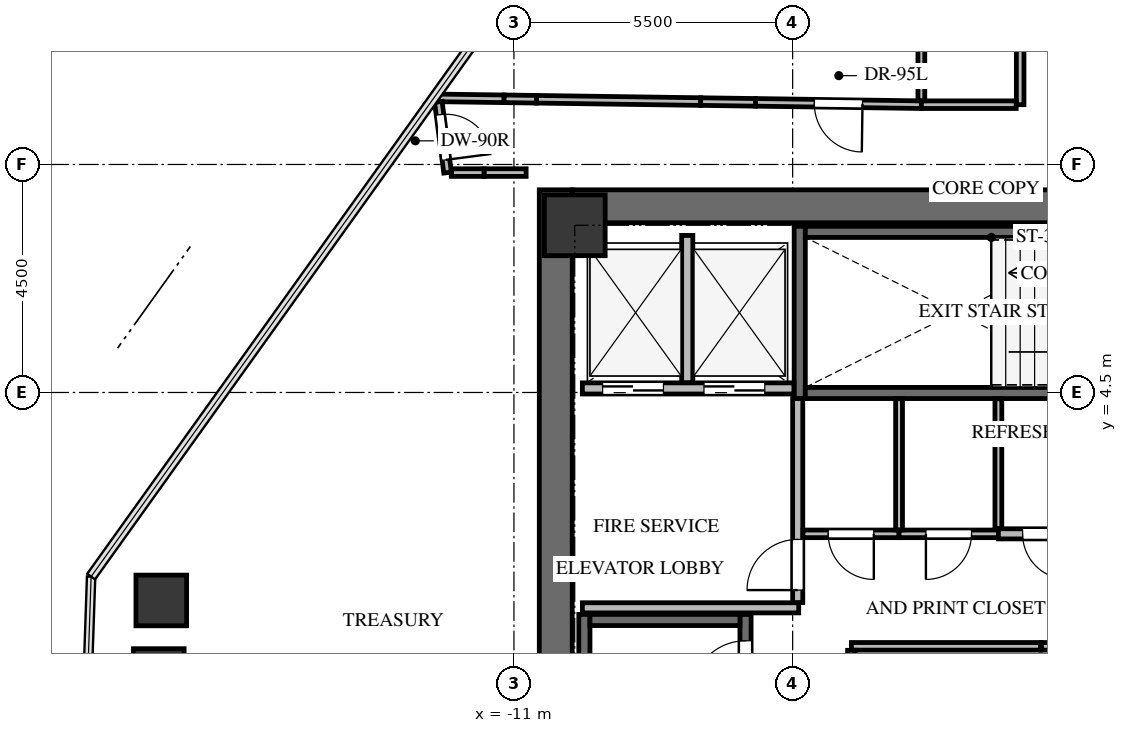
"""IFC4 building model, lengths in metres.
Left out: names, types, materials, properties, quantities, classifications, styles, units other than length and angle.
Written with IfcOpenShell. Run it as: python <this file> out.ifc"""

import sys

from ifc_helpers import new_model, si_unit, direction, frame, frame_2d, origin, origin_2d, place, context, subcontext, project, spatial, rectangle, extrude, source, transform, mapped, element, fill, save


model = new_model("IFC4")
c1 = context("Model", 3, precision=1e-05, world=origin(), true_north=direction((0.0, 1.0)))
c2 = subcontext(c1, "Body", "Model", "MODEL_VIEW")
j1 = project(units=[si_unit("LENGTHUNIT", "METRE"), si_unit("PLANEANGLEUNIT", "RADIAN")], contexts=[c1])
p1 = place(None, origin())
s1 = spatial("IfcSite", under=j1, at=p1, CompositionType="ELEMENT")
p2 = place(p1, origin())
s2 = spatial("IfcBuilding", under=s1, at=p2, CompositionType="ELEMENT")
p3 = place(p2, frame((0.0, 0.0, 203.2)))
s3 = spatial("IfcBuildingStorey", under=s2, at=p3, CompositionType="ELEMENT", Elevation=203.2)
p4 = place(p3, frame((-10.175, -8.5, 0.0), z_axis=(0.0, 0.0, 1.0), x_axis=(0.0, 1.0, 0.0)))
e1 = element("IfcWall", 1, at=p4, inside=s3, PredefinedType="SHEAR", context=c2, shape_type="SweptSolid", body=[
    extrude(rectangle(XDim=17.0, YDim=0.65, at=frame_2d((8.5, 0.0))), origin(), (0.0, 0.0, 1.0), 3.0),
])
p5 = place(p3, frame((-9.85, 8.175, 0.0), z_axis=(0.0, 0.0, 1.0), x_axis=(1.0, 0.0, 0.0)))
e2 = element("IfcWall", 2, at=p5, inside=s3, PredefinedType="SHEAR", context=c2, shape_type="SweptSolid", body=[
    extrude(rectangle(XDim=19.7, YDim=0.65, at=frame_2d((9.85, 0.0))), origin(), (0.0, 0.0, 1.0), 3.0),
])
p6 = place(p3, frame((-6.43, -7.77, -0.24), z_axis=(0.0, 0.0, 1.0), x_axis=(0.0, 1.0, 0.0)))
e3 = element("IfcWall", 3, at=p6, inside=s3, PredefinedType="SHEAR", context=c2, shape_type="SweptSolid", body=[
    extrude(rectangle(XDim=7.89, YDim=0.22, at=frame_2d((3.945, 0.0))), origin(), (0.0, 0.0, 1.0), 3.0),
])
p7 = place(p6, frame((6.32, 0.0, 0.0)))
e4 = element("IfcOpeningElement", 4, at=p7, cuts=e3, PredefinedType="OPENING", context=c2, shape_type="SweptSolid", body=[
    extrude(rectangle(XDim=1.05, YDim=2.15, at=frame_2d((0.525, 1.075))), frame((0.0, 0.12, 0.0), z_axis=(0.0, -1.0, 0.0), x_axis=(1.0, 0.0, 0.0)), (0.0, 0.0, 1.0), 0.24),
])
p8 = place(p3, frame((-9.61, 0.12, -0.24), z_axis=(0.0, 0.0, 1.0), x_axis=(0.0, -1.0, 0.0)))
e5 = element("IfcWall", 5, at=p8, inside=s3, PredefinedType="SHEAR", context=c2, shape_type="SweptSolid", body=[
    extrude(rectangle(XDim=7.89, YDim=0.22, at=frame_2d((3.945, 0.0))), origin(), (0.0, 0.0, 1.0), 3.0),
])
p9 = place(p3, frame((-6.54, 0.01, -0.24), z_axis=(0.0, 0.0, 1.0), x_axis=(-1.0, 0.0, 0.0)))
e6 = element("IfcWall", 6, at=p9, inside=s3, PredefinedType="SHEAR", context=c2, shape_type="SweptSolid", body=[
    extrude(rectangle(XDim=2.96, YDim=0.22, at=frame_2d((1.48, 0.0))), origin(), (0.0, 0.0, 1.0), 3.0),
])
p10 = place(p3, frame((-5.36, 7.78, -0.24), z_axis=(0.0, 0.0, 1.0), x_axis=(0.0, -1.0, 0.0)))
e7 = element("IfcWall", 7, at=p10, inside=s3, PredefinedType="SHEAR", context=c2, shape_type="SweptSolid", body=[
    extrude(rectangle(XDim=3.4, YDim=0.22, at=frame_2d((1.7, 0.0))), origin(), (0.0, 0.0, 1.0), 3.0),
])
p11 = place(p3, frame((-5.25, 4.49, -0.24), z_axis=(0.0, 0.0, 1.0), x_axis=(1.0, 0.0, 0.0)))
e8 = element("IfcWall", 8, at=p11, inside=s3, PredefinedType="SHEAR", context=c2, shape_type="SweptSolid", body=[
    extrude(rectangle(XDim=7.35, YDim=0.22, at=frame_2d((3.675, 0.0))), origin(), (0.0, 0.0, 1.0), 3.0),
])
p12 = place(p11, frame((5.85, 0.0, 0.0)))
e9 = element("IfcOpeningElement", 9, at=p12, cuts=e8, PredefinedType="OPENING", context=c2, shape_type="SweptSolid", body=[
    extrude(rectangle(XDim=1.05, YDim=2.15, at=frame_2d((0.525, 1.075))), frame((0.0, 0.12, 0.0), z_axis=(0.0, -1.0, 0.0), x_axis=(1.0, 0.0, 0.0)), (0.0, 0.0, 1.0), 0.24),
])
p13 = place(p3, frame((2.1, 7.67, -0.24), z_axis=(0.0, 0.0, 1.0), x_axis=(-1.0, 0.0, 0.0)))
e10 = element("IfcWall", 10, at=p13, inside=s3, PredefinedType="SHEAR", context=c2, shape_type="SweptSolid", body=[
    extrude(rectangle(XDim=7.35, YDim=0.22, at=frame_2d((3.675, 0.0))), origin(), (0.0, 0.0, 1.0), 3.0),
])
m1 = source(origin(), c2, "Body", "SweptSolid", [
    extrude(rectangle(XDim=1.2, YDim=1.2, at=origin_2d()), origin(), (0.0, 0.0, 1.0), 3.0),
])
p14 = place(p3, frame((-9.8, 7.8, -0.24), z_axis=(0.0, 0.0, 1.0), x_axis=(1.0, 0.0, 0.0)))
e11 = element("IfcColumn", 11, at=p14, inside=s3, PredefinedType="COLUMN", context=c2, shape_type="MappedRepresentation", body=[
    mapped(m1, transform((0.0, 0.0, 0.0), x_axis=(1.0, 0.0, 0.0), y_axis=(0.0, 1.0, 0.0), z_axis=(0.0, 0.0, 1.0), scale=1.0)),
])
m2 = source(origin(), c2, "Body", "SweptSolid", [
    extrude(rectangle(XDim=1.0, YDim=1.0, at=origin_2d()), origin(), (0.0, 0.0, 1.0), 3.0),
])
for number, where, z_axis, x_axis in (
    (12, (-18.009, -1.057, -0.24), (0.0, 0.0, 1.0), (1.0, 0.0, 0.0)),
    (13, (-17.96, 0.396, -0.24), (0.0, 0.0, 1.0), (1.0, 0.0, 0.0)),
):
    element("IfcColumn", number, at=place(p3, frame(where, z_axis=z_axis, x_axis=x_axis)), inside=s3, PredefinedType="COLUMN", context=c2, shape_type="MappedRepresentation", body=[
        mapped(m2, transform((0.0, 0.0, 0.0), x_axis=(1.0, 0.0, 0.0), y_axis=(0.0, 1.0, 0.0), z_axis=(0.0, 0.0, 1.0), scale=1.0)),
    ])
p15 = place(p3, frame((-9.65, 4.58, 0.0), z_axis=(0.0, 0.0, 1.0), x_axis=(1.0, 0.0, 0.0)))
e14 = element("IfcWall", 14, at=p15, inside=s3, PredefinedType="SOLIDWALL", context=c2, shape_type="SweptSolid", body=[
    extrude(rectangle(XDim=4.175, YDim=0.22, at=frame_2d((2.087, 0.0))), origin(), (0.0, 0.0, 1.0), 2.745),
])
p16 = place(p15, frame((0.4, 0.0, 0.0)))
e15 = element("IfcOpeningElement", 15, at=p16, cuts=e14, PredefinedType="OPENING", context=c2, shape_type="SweptSolid", body=[
    extrude(rectangle(XDim=1.2, YDim=2.15, at=frame_2d((0.6, 1.075))), frame((0.0, 0.12, 0.0), z_axis=(0.0, -1.0, 0.0), x_axis=(1.0, 0.0, 0.0)), (0.0, 0.0, 1.0), 0.24),
])
p17 = place(p15, frame((2.4, 0.0, 0.0)))
e16 = element("IfcOpeningElement", 16, at=p17, cuts=e14, PredefinedType="OPENING", context=c2, shape_type="SweptSolid", body=[
    extrude(rectangle(XDim=1.2, YDim=2.15, at=frame_2d((0.6, 1.075))), frame((0.0, 0.12, 0.0), z_axis=(0.0, -1.0, 0.0), x_axis=(1.0, 0.0, 0.0)), (0.0, 0.0, 1.0), 0.24),
])
p18 = place(p3, frame((-7.58, 4.694, 0.0), z_axis=(0.0, 0.0, 1.0), x_axis=(0.0, 1.0, 0.0)))
e17 = element("IfcWall", 17, at=p18, inside=s3, PredefinedType="SOLIDWALL", context=c2, shape_type="SweptSolid", body=[
    extrude(rectangle(XDim=2.906, YDim=0.22, at=frame_2d((1.453, 0.0))), origin(), (0.0, 0.0, 1.0), 2.745),
])
p19 = place(p3, frame((-9.65, 0.25, 0.0), z_axis=(0.0, 0.0, 1.0), x_axis=(1.0, 0.0, 0.0)))
e18 = element("IfcWall", 18, at=p19, inside=s3, PredefinedType="SOLIDWALL", context=c2, shape_type="SweptSolid", body=[
    extrude(rectangle(XDim=4.27, YDim=0.2, at=frame_2d((2.135, 0.0))), origin(), (0.0, 0.0, 1.0), 2.745),
])
p20 = place(p3, frame((-5.4, 0.354, 0.0), z_axis=(0.0, 0.0, 1.0), x_axis=(0.0, 1.0, 0.0)))
e19 = element("IfcWall", 19, at=p20, inside=s3, PredefinedType="SOLIDWALL", context=c2, shape_type="SweptSolid", body=[
    extrude(rectangle(XDim=4.026, YDim=0.2, at=frame_2d((2.013, 0.0))), origin(), (0.0, 0.0, 1.0), 2.745),
])
p21 = place(p20, frame((0.246, 0.0, 0.0)))
e20 = element("IfcOpeningElement", 20, at=p21, cuts=e19, PredefinedType="OPENING", context=c2, shape_type="SweptSolid", body=[
    extrude(rectangle(XDim=1.0, YDim=2.15, at=frame_2d((0.5, 1.075))), frame((0.0, 0.11, 0.0), z_axis=(0.0, -1.0, 0.0), x_axis=(1.0, 0.0, 0.0)), (0.0, 0.0, 1.0), 0.22),
])
p22 = place(p3, frame((-4.34, -0.51, 0.0), z_axis=(0.0, 0.0, 1.0), x_axis=(1.0, 0.0, 0.0)))
e21 = element("IfcWall", 21, at=p22, inside=s3, PredefinedType="PARTITIONING", context=c2, shape_type="SweptSolid", body=[
    extrude(rectangle(XDim=3.73, YDim=0.15, at=frame_2d((1.865, 0.0))), origin(), (0.0, 0.0, 1.0), 2.745),
])
p23 = place(p3, frame((-4.34, -2.961, 0.0), z_axis=(0.0, 0.0, 1.0), x_axis=(0.0, 1.0, 0.0)))
e22 = element("IfcWall", 22, at=p23, inside=s3, PredefinedType="PARTITIONING", context=c2, shape_type="SweptSolid", body=[
    extrude(rectangle(XDim=2.372, YDim=0.15, at=frame_2d((1.186, 0.0))), origin(), (0.0, 0.0, 1.0), 2.745),
])
p24 = place(p3, frame((-0.59, -0.51, 0.0), z_axis=(0.0, 0.0, 1.0), x_axis=(1.0, 0.0, 0.0)))
e23 = element("IfcWall", 23, at=p24, inside=s3, PredefinedType="PARTITIONING", context=c2, shape_type="SweptSolid", body=[
    extrude(rectangle(XDim=3.73, YDim=0.15, at=frame_2d((1.865, 0.0))), origin(), (0.0, 0.0, 1.0), 2.745),
])
p25 = place(p3, frame((-3.4, 1.71, 0.0), z_axis=(0.0, 0.0, 1.0), x_axis=(-1.0, 0.0, 0.0)))
e24 = element("IfcWall", 24, at=p25, inside=s3, PredefinedType="PARTITIONING", context=c2, shape_type="SweptSolid", body=[
    extrude(rectangle(XDim=1.896, YDim=0.15, at=frame_2d((0.948, 0.0))), origin(), (0.0, 0.0, 1.0), 2.745),
])
p26 = place(p25, frame((0.498, 0.0, 0.0)))
e25 = element("IfcOpeningElement", 25, at=p26, cuts=e24, PredefinedType="OPENING", context=c2, shape_type="SweptSolid", body=[
    extrude(rectangle(XDim=0.9, YDim=2.05, at=frame_2d((0.45, 1.025))), frame((0.0, 0.085, 0.0), z_axis=(0.0, -1.0, 0.0), x_axis=(1.0, 0.0, 0.0)), (0.0, 0.0, 1.0), 0.17),
])
p27 = place(p3, frame((-1.44, 1.71, 0.0), z_axis=(0.0, 0.0, 1.0), x_axis=(-1.0, 0.0, 0.0)))
e26 = element("IfcWall", 26, at=p27, inside=s3, PredefinedType="PARTITIONING", context=c2, shape_type="SweptSolid", body=[
    extrude(rectangle(XDim=1.96, YDim=0.15, at=frame_2d((0.98, 0.0))), origin(), (0.0, 0.0, 1.0), 2.745),
])
p28 = place(p27, frame((0.53, 0.0, 0.0)))
e27 = element("IfcOpeningElement", 27, at=p28, cuts=e26, PredefinedType="OPENING", context=c2, shape_type="SweptSolid", body=[
    extrude(rectangle(XDim=0.9, YDim=2.05, at=frame_2d((0.45, 1.025))), frame((0.0, 0.085, 0.0), z_axis=(0.0, -1.0, 0.0), x_axis=(1.0, 0.0, 0.0)), (0.0, 0.0, 1.0), 0.17),
])
p29 = place(p3, frame((0.416, 1.71, 0.0), z_axis=(0.0, 0.0, 1.0), x_axis=(-1.0, 0.0, 0.0)))
e28 = element("IfcWall", 28, at=p29, inside=s3, PredefinedType="SOLIDWALL", context=c2, shape_type="SweptSolid", body=[
    extrude(rectangle(XDim=1.856, YDim=0.2, at=frame_2d((0.928, 0.0))), origin(), (0.0, 0.0, 1.0), 2.745),
])
p30 = place(p29, frame((0.478, 0.0, 0.0)))
e29 = element("IfcOpeningElement", 29, at=p30, cuts=e28, PredefinedType="OPENING", context=c2, shape_type="SweptSolid", body=[
    extrude(rectangle(XDim=0.9, YDim=2.05, at=frame_2d((0.45, 1.025))), frame((0.0, 0.11, 0.0), z_axis=(0.0, -1.0, 0.0), x_axis=(1.0, 0.0, 0.0)), (0.0, 0.0, 1.0), 0.22),
])
p31 = place(p3, frame((-2.96, 10.18, 0.0), z_axis=(0.0, 0.0, 1.0), x_axis=(-0.999900650504, 0.014095712907, 0.0)))
e30 = element("IfcWall", 30, at=p31, inside=s3, PredefinedType="PARTITIONING", context=c2, shape_type="SweptSolid", body=[
    extrude(rectangle(XDim=3.273, YDim=0.15, at=frame_2d((1.637, 0.0))), origin(), (0.0, 0.0, 1.0), 2.308),
])
p32 = place(p31, frame((1.162, 0.0, 0.0)))
e31 = element("IfcOpeningElement", 31, at=p32, cuts=e30, PredefinedType="OPENING", context=c2, shape_type="SweptSolid", body=[
    extrude(rectangle(XDim=0.95, YDim=2.1, at=frame_2d((0.475, 1.05))), frame((0.0, 0.085, 0.0), z_axis=(0.0, -1.0, 0.0), x_axis=(1.0, 0.0, 0.0)), (0.0, 0.0, 1.0), 0.17),
])
p33 = place(p3, frame((-7.315, 10.241, 0.0), z_axis=(0.0, 0.0, 1.0), x_axis=(-0.99990075336, 0.014088414774, 0.0)))
e32 = element("IfcWall", 32, at=p33, inside=s3, PredefinedType="PARTITIONING", context=c2, shape_type="SweptSolid", body=[
    extrude(rectangle(XDim=3.24, YDim=0.15, at=frame_2d((1.62, 0.0))), origin(), (0.0, 0.0, 1.0), 2.745),
])
p34 = place(p3, frame((-11.194, 10.296, 0.0), z_axis=(0.0, 0.0, 1.0), x_axis=(-0.999900583231, 0.014100484163, 0.0)))
e33 = element("IfcWall", 33, at=p34, inside=s3, PredefinedType="PARTITIONING", context=c2, shape_type="SweptSolid", body=[
    extrude(rectangle(XDim=1.385, YDim=0.15, at=frame_2d((0.693, 0.0))), origin(), (0.0, 0.0, 1.0), 2.745),
])
p35 = place(p3, frame((-6.233, 10.226, 0.0), z_axis=(0.0, 0.0, 1.0), x_axis=(-0.999898893801, 0.014219781108, 0.0)))
e34 = element("IfcWall", 34, at=p35, inside=s3, PredefinedType="PARTITIONING", context=c2, shape_type="SweptSolid", body=[
    extrude(rectangle(XDim=1.082, YDim=0.15, at=frame_2d((0.541, 0.0))), origin(), (0.0, 0.0, 1.0), 1.942),
])
p36 = place(p3, frame((-10.555, 10.287, 0.0), z_axis=(0.0, 0.0, 1.0), x_axis=(-0.999900221389, 0.014126119966, 0.0)))
e35 = element("IfcWall", 35, at=p36, inside=s3, PredefinedType="PARTITIONING", context=c2, shape_type="SweptSolid", body=[
    extrude(rectangle(XDim=0.639, YDim=0.15, at=frame_2d((0.32, 0.0))), origin(), (0.0, 0.0, 1.0), 2.099),
])
p37 = place(p3, frame((-1.01, 14.755, 0.0), z_axis=(0.0, 0.0, 1.0), x_axis=(0.0, -1.0, 0.0)))
e36 = element("IfcWall", 36, at=p37, inside=s3, PredefinedType="PARTITIONING", context=c2, shape_type="SweptSolid", body=[
    extrude(rectangle(XDim=4.575, YDim=0.15, at=frame_2d((2.288, 0.0))), origin(), (0.0, 0.0, 1.0), 2.745),
])
p38 = place(p37, frame((1.488, 0.0, 0.0)))
e37 = element("IfcOpeningElement", 37, at=p38, cuts=e36, PredefinedType="OPENING", context=c2, shape_type="SweptSolid", body=[
    extrude(rectangle(XDim=1.6, YDim=2.15, at=frame_2d((0.8, 1.075))), frame((0.0, 0.085, 0.0), z_axis=(0.0, -1.0, 0.0), x_axis=(1.0, 0.0, 0.0)), (0.0, 0.0, 1.0), 0.17),
])
p39 = place(p3, frame((-1.089, 10.18, 0.0), z_axis=(0.0, 0.0, 1.0), x_axis=(-1.0, 0.0, 0.0)))
e38 = element("IfcWall", 38, at=p39, inside=s3, PredefinedType="PARTITIONING", context=c2, shape_type="SweptSolid", body=[
    extrude(rectangle(XDim=1.871, YDim=0.15, at=frame_2d((0.936, 0.0))), origin(), (0.0, 0.0, 1.0), 2.745),
])
p40 = place(p3, frame((-11.591, 8.84, 0.0), z_axis=(0.0, 0.0, 1.0), x_axis=(1.0, 0.0, 0.0)))
e39 = element("IfcWall", 39, at=p40, inside=s3, PredefinedType="PARTITIONING", context=c2, shape_type="SweptSolid", body=[
    extrude(rectangle(XDim=0.831, YDim=0.15, at=frame_2d((0.416, 0.0))), origin(), (0.0, 0.0, 1.0), 2.745),
])
p41 = place(p3, frame((-12.237, 8.84, 0.0), z_axis=(0.0, 0.0, 1.0), x_axis=(1.0, 0.0, 0.0)))
e40 = element("IfcWall", 40, at=p41, inside=s3, PredefinedType="PARTITIONING", context=c2, shape_type="SweptSolid", body=[
    extrude(rectangle(XDim=0.646, YDim=0.15, at=frame_2d((0.323, 0.0))), origin(), (0.0, 0.0, 1.0), 2.099),
])
p42 = place(p3, frame((-12.492, 10.235, 0.0), z_axis=(0.0, 0.0, 1.0), x_axis=(0.129435611613, -0.991587828912, 0.0)))
e41 = element("IfcWall", 41, at=p42, inside=s3, PredefinedType="PARTITIONING", context=c2, shape_type="SweptSolid", body=[
    extrude(rectangle(XDim=1.407, YDim=0.15, at=frame_2d((0.704, 0.0))), origin(), (0.0, 0.0, 1.0), 2.745),
])
p43 = place(p42, frame((0.254, 0.0, 0.0)))
e42 = element("IfcOpeningElement", 42, at=p43, cuts=e41, PredefinedType="OPENING", context=c2, shape_type="SweptSolid", body=[
    extrude(rectangle(XDim=0.9, YDim=2.05, at=frame_2d((0.45, 1.025))), frame((0.0, 0.085, 0.0), z_axis=(0.0, -1.0, 0.0), x_axis=(1.0, 0.0, 0.0)), (0.0, 0.0, 1.0), 0.17),
])
p44 = place(p3, frame((-3.4, 4.375, 0.0), z_axis=(0.0, 0.0, 1.0), x_axis=(0.0, -1.0, 0.0)))
e43 = element("IfcWall", 43, at=p44, inside=s3, PredefinedType="PARTITIONING", context=c2, shape_type="SweptSolid", body=[
    extrude(rectangle(XDim=2.586, YDim=0.135, at=frame_2d((1.293, 0.0))), origin(), (0.0, 0.0, 1.0), 2.745),
])
p45 = place(p3, frame((-1.44, 4.375, 0.0), z_axis=(0.0, 0.0, 1.0), x_axis=(0.0, -1.0, 0.0)))
e44 = element("IfcWall", 44, at=p45, inside=s3, PredefinedType="PARTITIONING", context=c2, shape_type="SweptSolid", body=[
    extrude(rectangle(XDim=2.561, YDim=0.135, at=frame_2d((1.281, 0.0))), origin(), (0.0, 0.0, 1.0), 2.745),
])
p46 = place(p3, frame((-2.96, 14.755, 0.0), z_axis=(0.0, 0.0, 1.0), x_axis=(0.0, -1.0, 0.0)))
e45 = element("IfcWall", 45, at=p46, inside=s3, PredefinedType="PARTITIONING", context=c2, shape_type="SweptSolid", body=[
    extrude(rectangle(XDim=4.496, YDim=0.135, at=frame_2d((2.248, 0.0))), origin(), (0.0, 0.0, 1.0), 2.745),
])
m3 = source(origin(), c2, "Body", "SweptSolid", [
    extrude(rectangle(XDim=1.05, YDim=2.15, at=frame_2d((0.525, 1.075))), frame((0.0, 0.025, 0.0), z_axis=(0.0, -1.0, 0.0), x_axis=(1.0, 0.0, 0.0)), (0.0, 0.0, 1.0), 0.05),
])
p47 = place(p7, origin())
e46 = element("IfcDoor", 46, at=p47, inside=s3, OperationType="SINGLE_SWING_LEFT", PredefinedType="DOOR", context=c2, shape_type="MappedRepresentation", body=[
    mapped(m3, transform((0.0, 0.0, 0.0), x_axis=(1.0, 0.0, 0.0), y_axis=(0.0, 1.0, 0.0), z_axis=(0.0, 0.0, 1.0), scale=1.0)),
])
fill(e4, e46)
m4 = source(origin(), c2, "Body", "SweptSolid", [
    extrude(rectangle(XDim=1.2, YDim=2.15, at=frame_2d((0.6, 1.075))), frame((0.0, 0.025, 0.0), z_axis=(0.0, -1.0, 0.0), x_axis=(1.0, 0.0, 0.0)), (0.0, 0.0, 1.0), 0.05),
])
p48 = place(p16, origin())
e47 = element("IfcDoor", 47, at=p48, inside=s3, OperationType="DOUBLE_DOOR_SLIDING", PredefinedType="DOOR", context=c2, shape_type="MappedRepresentation", body=[
    mapped(m4, transform((0.0, 0.0, 0.0), x_axis=(1.0, 0.0, 0.0), y_axis=(0.0, 1.0, 0.0), z_axis=(0.0, 0.0, 1.0), scale=1.0)),
])
fill(e15, e47)
p49 = place(p17, origin())
e48 = element("IfcDoor", 48, at=p49, inside=s3, OperationType="DOUBLE_DOOR_SLIDING", PredefinedType="DOOR", context=c2, shape_type="MappedRepresentation", body=[
    mapped(m4, transform((0.0, 0.0, 0.0), x_axis=(1.0, 0.0, 0.0), y_axis=(0.0, 1.0, 0.0), z_axis=(0.0, 0.0, 1.0), scale=1.0)),
])
fill(e16, e48)
m5 = source(origin(), c2, "Body", "SweptSolid", [
    extrude(rectangle(XDim=1.0, YDim=2.15, at=frame_2d((0.5, 1.075))), frame((0.0, 0.025, 0.0), z_axis=(0.0, -1.0, 0.0), x_axis=(1.0, 0.0, 0.0)), (0.0, 0.0, 1.0), 0.05),
])
p50 = place(p21, origin())
e49 = element("IfcDoor", 49, at=p50, inside=s3, OperationType="SINGLE_SWING_LEFT", PredefinedType="DOOR", context=c2, shape_type="MappedRepresentation", body=[
    mapped(m5, transform((0.0, 0.0, 0.0), x_axis=(1.0, 0.0, 0.0), y_axis=(0.0, 1.0, 0.0), z_axis=(0.0, 0.0, 1.0), scale=1.0)),
])
fill(e20, e49)
m6 = source(origin(), c2, "Body", "SweptSolid", [
    extrude(rectangle(XDim=0.9, YDim=2.05, at=frame_2d((0.45, 1.025))), frame((0.0, 0.025, 0.0), z_axis=(0.0, -1.0, 0.0), x_axis=(1.0, 0.0, 0.0)), (0.0, 0.0, 1.0), 0.05),
])
p51 = place(p26, origin())
e50 = element("IfcDoor", 50, at=p51, inside=s3, OperationType="SINGLE_SWING_LEFT", PredefinedType="DOOR", context=c2, shape_type="MappedRepresentation", body=[
    mapped(m6, transform((0.0, 0.0, 0.0), x_axis=(1.0, 0.0, 0.0), y_axis=(0.0, 1.0, 0.0), z_axis=(0.0, 0.0, 1.0), scale=1.0)),
])
fill(e25, e50)
m7 = source(origin(), c2, "Body", "SweptSolid", [
    extrude(rectangle(XDim=0.9, YDim=2.05, at=frame_2d((0.45, 1.025))), frame((0.0, 0.025, 0.0), z_axis=(0.0, -1.0, 0.0), x_axis=(1.0, 0.0, 0.0)), (0.0, 0.0, 1.0), 0.05),
])
p52 = place(p28, origin())
e51 = element("IfcDoor", 51, at=p52, inside=s3, OperationType="SINGLE_SWING_RIGHT", PredefinedType="DOOR", context=c2, shape_type="MappedRepresentation", body=[
    mapped(m7, transform((0.0, 0.0, 0.0), x_axis=(1.0, 0.0, 0.0), y_axis=(0.0, 1.0, 0.0), z_axis=(0.0, 0.0, 1.0), scale=1.0)),
])
fill(e27, e51)
p53 = place(p30, origin())
e52 = element("IfcDoor", 52, at=p53, inside=s3, OperationType="SINGLE_SWING_LEFT", PredefinedType="DOOR", context=c2, shape_type="MappedRepresentation", body=[
    mapped(m6, transform((0.0, 0.0, 0.0), x_axis=(1.0, 0.0, 0.0), y_axis=(0.0, 1.0, 0.0), z_axis=(0.0, 0.0, 1.0), scale=1.0)),
])
fill(e29, e52)
m8 = source(origin(), c2, "Body", "SweptSolid", [
    extrude(rectangle(XDim=0.95, YDim=2.1, at=frame_2d((0.475, 1.05))), frame((0.0, 0.025, 0.0), z_axis=(0.0, -1.0, 0.0), x_axis=(1.0, 0.0, 0.0)), (0.0, 0.0, 1.0), 0.05),
])
p54 = place(p32, origin())
e53 = element("IfcDoor", 53, at=p54, inside=s3, OperationType="SINGLE_SWING_LEFT", PredefinedType="DOOR", context=c2, shape_type="MappedRepresentation", body=[
    mapped(m8, transform((0.0, 0.0, 0.0), x_axis=(1.0, 0.0, 0.0), y_axis=(0.0, 1.0, 0.0), z_axis=(0.0, 0.0, 1.0), scale=1.0)),
])
fill(e31, e53)
m9 = source(origin(), c2, "Body", "SweptSolid", [
    extrude(rectangle(XDim=0.9, YDim=2.05, at=frame_2d((0.45, 1.025))), frame((0.0, 0.025, 0.0), z_axis=(0.0, -1.0, 0.0), x_axis=(1.0, 0.0, 0.0)), (0.0, 0.0, 1.0), 0.05),
])
p55 = place(p43, origin())
e54 = element("IfcDoor", 54, at=p55, inside=s3, OperationType="SINGLE_SWING_RIGHT", PredefinedType="DOOR", context=c2, shape_type="MappedRepresentation", body=[
    mapped(m9, transform((0.0, 0.0, 0.0), x_axis=(1.0, 0.0, 0.0), y_axis=(0.0, 1.0, 0.0), z_axis=(0.0, 0.0, 1.0), scale=1.0)),
])
fill(e42, e54)
save(model, sys.argv[1])
